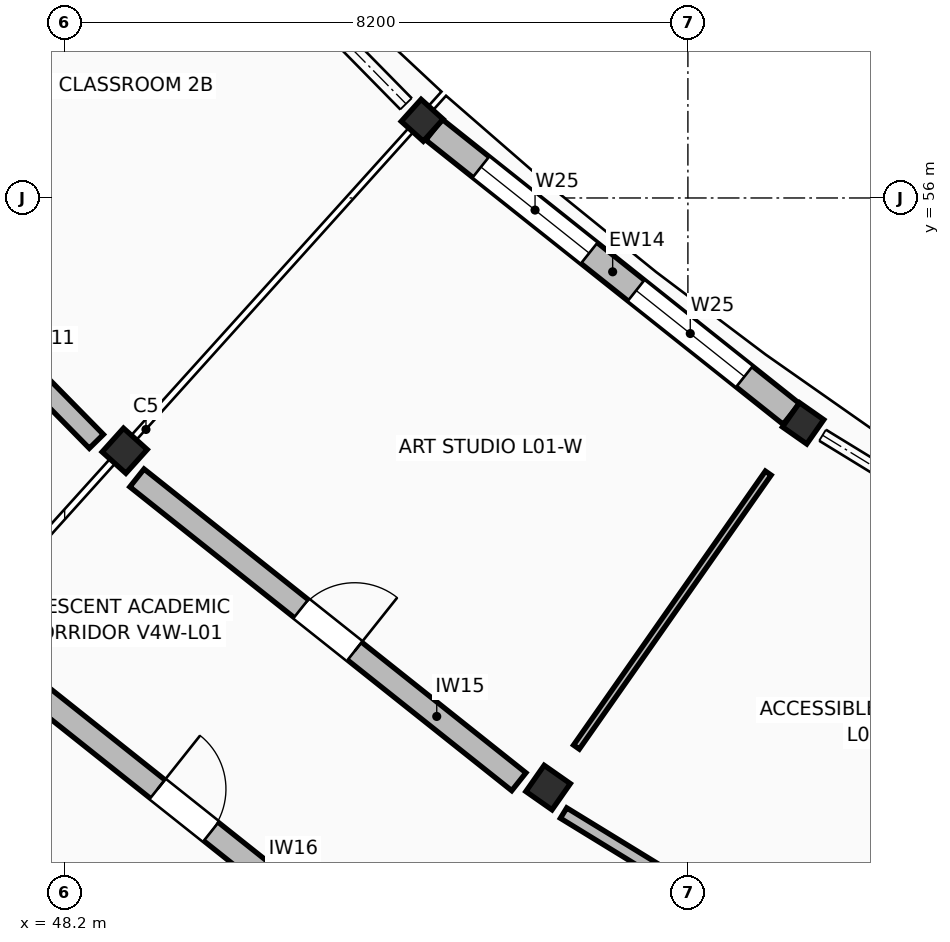
"""IFC4 building model, lengths in metres.
Left out: names, types, materials, properties, quantities, classifications, styles, units other than length and angle.
Written with IfcOpenShell. Run it as: python <this file> out.ifc"""

import sys

from ifc_helpers import new_model, si_unit, direction, frame, frame_2d, origin, origin_2d, place, context, subcontext, project, spatial, rectangle, extrude, element, fill, save


model = new_model("IFC4")
c1 = context("Model", 3, precision=1e-05, world=origin(), true_north=direction((0.0, 1.0)))
c2 = subcontext(c1, "Body", "Model", "MODEL_VIEW")
j1 = project(units=[si_unit("LENGTHUNIT", "METRE"), si_unit("PLANEANGLEUNIT", "RADIAN")], contexts=[c1])
p1 = place(None, origin())
s1 = spatial("IfcSite", under=j1, at=p1, CompositionType="ELEMENT")
p2 = place(p1, origin())
s2 = spatial("IfcBuilding", under=s1, at=p2, CompositionType="ELEMENT")
p3 = place(p2, frame((0.0, 0.0, 4.42)))
s3 = spatial("IfcBuildingStorey", under=s2, at=p3, CompositionType="ELEMENT", Elevation=4.42)
p4 = place(p3, frame((52.904, 57.022, 0.0), z_axis=(0.0, 0.0, 1.0), x_axis=(-0.669130606359, -0.743144825477, 0.0)))
e1 = element("IfcColumn", 1, at=p4, inside=s3, PredefinedType="COLUMN", context=c2, shape_type="SweptSolid", body=[
    extrude(rectangle(XDim=0.39, YDim=0.39, at=origin_2d()), origin(), (0.0, 0.0, 1.0), 3.74),
])
p5 = place(p3, frame((48.99, 52.675, 0.0), z_axis=(0.0, 0.0, 1.0), x_axis=(-0.669130606359, -0.743144825477, 0.0)))
e2 = element("IfcColumn", 2, at=p5, inside=s3, PredefinedType="COLUMN", context=c2, shape_type="SweptSolid", body=[
    extrude(rectangle(XDim=0.42, YDim=0.42, at=origin_2d()), origin(), (0.0, 0.0, 1.0), 3.74),
])
p6 = place(p3, frame((57.916, 53.035, 0.0), z_axis=(0.0, 0.0, 1.0), x_axis=(-0.573576436351, -0.819152044289, 0.0)))
e3 = element("IfcColumn", 3, at=p6, inside=s3, PredefinedType="COLUMN", context=c2, shape_type="SweptSolid", body=[
    extrude(rectangle(XDim=0.39, YDim=0.39, at=origin_2d()), origin(), (0.0, 0.0, 1.0), 3.74),
])
p7 = place(p3, frame((54.561, 48.243, 0.0), z_axis=(0.0, 0.0, 1.0), x_axis=(-0.573576436351, -0.819152044289, 0.0)))
e4 = element("IfcColumn", 4, at=p7, inside=s3, PredefinedType="COLUMN", context=c2, shape_type="SweptSolid", body=[
    extrude(rectangle(XDim=0.42, YDim=0.42, at=origin_2d()), origin(), (0.0, 0.0, 1.0), 3.74),
])
p8 = place(p3, frame((53.059, 56.899, 0.0), z_axis=(0.0, 0.0, 1.0), x_axis=(0.78261410235, -0.622507162049, 0.0)))
e5 = element("IfcWall", 5, at=p8, inside=s3, PredefinedType="STANDARD", context=c2, shape_type="SweptSolid", body=[
    extrude(rectangle(XDim=6.008, YDim=0.348, at=frame_2d((3.004, 0.0))), origin(), (0.0, 0.0, 1.0), 2.78),
])
p9 = place(p8, frame((0.789, 0.0, 0.95)))
e6 = element("IfcOpeningElement", 6, at=p9, cuts=e5, PredefinedType="OPENING", context=c2, shape_type="SweptSolid", body=[
    extrude(rectangle(XDim=1.82, YDim=1.15, at=frame_2d((0.91, 0.575))), frame((0.0, 0.184, 0.0), z_axis=(0.0, -1.0, 0.0), x_axis=(1.0, 0.0, 0.0)), (0.0, 0.0, 1.0), 0.368),
])
p10 = place(p8, frame((3.399, 0.0, 0.95)))
e7 = element("IfcOpeningElement", 7, at=p10, cuts=e5, PredefinedType="OPENING", context=c2, shape_type="SweptSolid", body=[
    extrude(rectangle(XDim=1.82, YDim=1.15, at=frame_2d((0.91, 0.575))), frame((0.0, 0.184, 0.0), z_axis=(0.0, -1.0, 0.0), x_axis=(1.0, 0.0, 0.0)), (0.0, 0.0, 1.0), 0.368),
])
p11 = place(p3, frame((44.117, 57.377, 0.0), z_axis=(0.0, 0.0, 1.0), x_axis=(0.700900509406, -0.713259052459, 0.0)))
e8 = element("IfcWall", 8, at=p11, inside=s3, PredefinedType="STANDARD", context=c2, shape_type="SweptSolid", body=[
    extrude(rectangle(XDim=6.42, YDim=0.26, at=frame_2d((3.21, 0.0))), origin(), (0.0, 0.0, 1.0), 2.75),
])
p12 = place(p11, frame((2.78, 0.0, 0.0)))
e9 = element("IfcOpeningElement", 9, at=p12, cuts=e8, PredefinedType="OPENING", context=c2, shape_type="SweptSolid", body=[
    extrude(rectangle(XDim=0.86, YDim=2.24, at=frame_2d((0.43, 1.12))), frame((0.0, 0.14, 0.0), z_axis=(0.0, -1.0, 0.0), x_axis=(1.0, 0.0, 0.0)), (0.0, 0.0, 1.0), 0.28),
])
p13 = place(p3, frame((49.151, 52.317, 0.0), z_axis=(0.0, 0.0, 1.0), x_axis=(0.782605685559, -0.622517743467, 0.0)))
e10 = element("IfcWall", 10, at=p13, inside=s3, PredefinedType="STANDARD", context=c2, shape_type="SweptSolid", body=[
    extrude(rectangle(XDim=6.42, YDim=0.3, at=frame_2d((3.21, 0.0))), origin(), (0.0, 0.0, 1.0), 2.75),
])
p14 = place(p13, frame((2.76, 0.0, 0.0)))
e11 = element("IfcOpeningElement", 11, at=p14, cuts=e10, PredefinedType="OPENING", context=c2, shape_type="SweptSolid", body=[
    extrude(rectangle(XDim=0.9, YDim=2.12, at=frame_2d((0.45, 1.06))), frame((0.0, 0.16, 0.0), z_axis=(0.0, -1.0, 0.0), x_axis=(1.0, 0.0, 0.0)), (0.0, 0.0, 1.0), 0.32),
])
p15 = place(p3, frame((47.117, 50.058, 0.0), z_axis=(0.0, 0.0, 1.0), x_axis=(0.782615780998, -0.622505051653, 0.0)))
e12 = element("IfcWall", 12, at=p15, inside=s3, PredefinedType="STANDARD", context=c2, shape_type="SweptSolid", body=[
    extrude(rectangle(XDim=6.792, YDim=0.31, at=frame_2d((3.396, 0.0))), origin(), (0.0, 0.0, 1.0), 2.75),
])
p16 = place(p15, frame((2.946, 0.0, 0.0)))
e13 = element("IfcOpeningElement", 13, at=p16, cuts=e12, PredefinedType="OPENING", context=c2, shape_type="SweptSolid", body=[
    extrude(rectangle(XDim=0.9, YDim=2.18, at=frame_2d((0.45, 1.09))), frame((0.0, 0.165, 0.0), z_axis=(0.0, -1.0, 0.0), x_axis=(1.0, 0.0, 0.0)), (0.0, 0.0, 1.0), 0.33),
])
p17 = place(p3, frame((54.764, 47.908, 0.0), z_axis=(0.0, 0.0, 1.0), x_axis=(0.852626937867, -0.522520147767, 0.0)))
e14 = element("IfcWall", 14, at=p17, inside=s3, PredefinedType="STANDARD", context=c2, shape_type="SweptSolid", body=[
    extrude(rectangle(XDim=6.42, YDim=0.16, at=frame_2d((3.21, 0.0))), origin(), (0.0, 0.0, 1.0), 2.75),
])
p18 = place(p17, frame((2.76, 0.0, 0.0)))
e15 = element("IfcOpeningElement", 15, at=p18, cuts=e14, PredefinedType="OPENING", context=c2, shape_type="SweptSolid", body=[
    extrude(rectangle(XDim=0.9, YDim=2.24, at=frame_2d((0.45, 1.12))), frame((0.0, 0.09, 0.0), z_axis=(0.0, -1.0, 0.0), x_axis=(1.0, 0.0, 0.0)), (0.0, 0.0, 1.0), 0.18),
])
p19 = place(p3, frame((57.457, 52.38, 0.0), z_axis=(0.0, 0.0, 1.0), x_axis=(-0.573570334442, -0.819156316858, 0.0)))
e16 = element("IfcWall", 16, at=p19, inside=s3, PredefinedType="PARTITIONING", context=c2, shape_type="SweptSolid", body=[
    extrude(rectangle(XDim=4.4, YDim=0.092, at=frame_2d((2.2, 0.0))), origin(), (0.0, 0.0, 1.0), 2.75),
])
p20 = place(p9, origin())
e17 = element("IfcWindow", 17, at=p20, inside=s3, PartitioningType="SINGLE_PANEL", PredefinedType="WINDOW", context=c2, shape_type="SweptSolid", body=[
    extrude(rectangle(XDim=1.82, YDim=1.15, at=frame_2d((0.91, 0.575))), frame((0.0, 0.03, 0.0), z_axis=(0.0, -1.0, 0.0), x_axis=(1.0, 0.0, 0.0)), (0.0, 0.0, 1.0), 0.06),
])
fill(e6, e17)
p21 = place(p10, origin())
e18 = element("IfcWindow", 18, at=p21, inside=s3, PartitioningType="SINGLE_PANEL", PredefinedType="WINDOW", context=c2, shape_type="SweptSolid", body=[
    extrude(rectangle(XDim=1.82, YDim=1.15, at=frame_2d((0.91, 0.575))), frame((0.0, 0.03, 0.0), z_axis=(0.0, -1.0, 0.0), x_axis=(1.0, 0.0, 0.0)), (0.0, 0.0, 1.0), 0.06),
])
fill(e7, e18)
p22 = place(p14, frame((0.9, 0.0, 0.0), z_axis=(0.0, 0.0, 1.0), x_axis=(-1.0, 0.0, 0.0)))
e19 = element("IfcDoor", 19, at=p22, inside=s3, OperationType="SINGLE_SWING_RIGHT", PredefinedType="DOOR", context=c2, shape_type="SweptSolid", body=[
    extrude(rectangle(XDim=0.9, YDim=2.12, at=frame_2d((0.45, 1.06))), frame((0.0, 0.025, 0.0), z_axis=(0.0, -1.0, 0.0), x_axis=(1.0, 0.0, 0.0)), (0.0, 0.0, 1.0), 0.05),
])
fill(e11, e19)
p23 = place(p16, origin())
e20 = element("IfcDoor", 20, at=p23, inside=s3, OperationType="SINGLE_SWING_LEFT", PredefinedType="DOOR", context=c2, shape_type="SweptSolid", body=[
    extrude(rectangle(XDim=0.9, YDim=2.18, at=frame_2d((0.45, 1.09))), frame((0.0, 0.025, 0.0), z_axis=(0.0, -1.0, 0.0), x_axis=(1.0, 0.0, 0.0)), (0.0, 0.0, 1.0), 0.05),
])
fill(e13, e20)
save(model, sys.argv[1])
